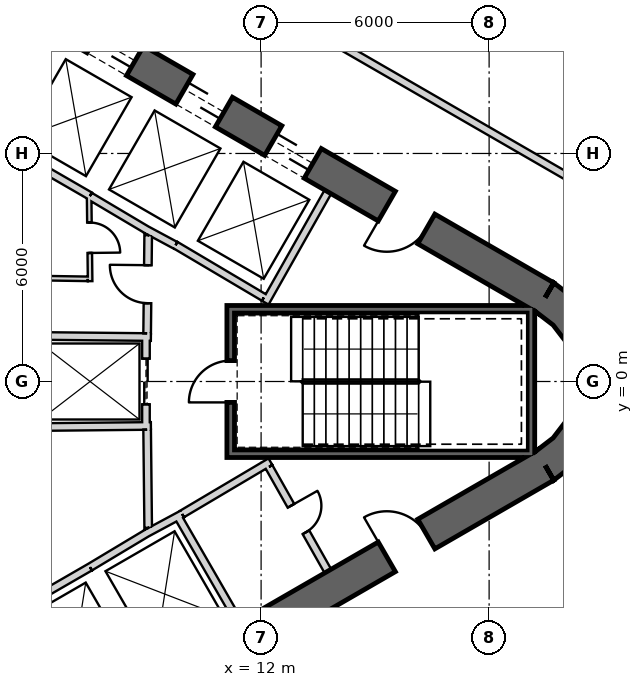
"""IFC4 building model, lengths in metres.
Left out: names, types, materials, properties, quantities, classifications, styles, units other than length and angle.
Written with IfcOpenShell. Run it as: python <this file> out.ifc"""

import sys

from ifc_helpers import new_model, si_unit, direction, frame, frame_2d, origin, place, context, subcontext, project, spatial, polyline, rectangle, outline, extrude, element, fill, save


model = new_model("IFC4")
c1 = context("Model", 3, precision=1e-05, world=origin(), true_north=direction((0.0, 1.0)))
c2 = subcontext(c1, "Body", "Model", "MODEL_VIEW")
j1 = project(units=[si_unit("LENGTHUNIT", "METRE"), si_unit("PLANEANGLEUNIT", "RADIAN")], contexts=[c1])
p1 = place(None, origin())
s1 = spatial("IfcSite", under=j1, at=p1, CompositionType="ELEMENT")
p2 = place(p1, origin())
s2 = spatial("IfcBuilding", under=s1, at=p2, CompositionType="ELEMENT")
p3 = place(p2, frame((0.0, 0.0, 57.8)))
s3 = spatial("IfcBuildingStorey", under=s2, at=p3, CompositionType="ELEMENT", Elevation=57.8)
p4 = place(p3, frame((19.475, 2.208, 0.0), z_axis=(0.0, 0.0, 1.0), x_axis=(-0.866028369851, 0.499994862586, 0.0)))
e1 = element("IfcWall", 1, at=p4, inside=s3, PredefinedType="SHEAR", context=c2, shape_type="SweptSolid", body=[
    extrude(rectangle(XDim=31.523, YDim=0.9, at=frame_2d((15.762, 0.0))), origin(), (0.0, 0.0, 1.0), 4.1),
])
p5 = place(p4, frame((7.062, 0.0, 0.0)))
e2 = element("IfcOpeningElement", 2, at=p5, cuts=e1, PredefinedType="OPENING", context=c2, shape_type="SweptSolid", body=[
    extrude(rectangle(XDim=1.2, YDim=2.4, at=frame_2d((0.6, 1.2))), frame((0.0, 0.46, 0.0), z_axis=(0.0, -1.0, 0.0), x_axis=(1.0, 0.0, 0.0)), (0.0, 0.0, 1.0), 0.92),
])
p6 = place(p4, frame((9.762, 0.0, 0.0)))
e3 = element("IfcOpeningElement", 3, at=p6, cuts=e1, PredefinedType="OPENING", context=c2, shape_type="SweptSolid", body=[
    extrude(rectangle(XDim=1.2, YDim=2.4, at=frame_2d((0.6, 1.2))), frame((0.0, 0.46, 0.0), z_axis=(0.0, -1.0, 0.0), x_axis=(1.0, 0.0, 0.0)), (0.0, 0.0, 1.0), 0.92),
])
p7 = place(p4, frame((12.462, 0.0, 0.0)))
e4 = element("IfcOpeningElement", 4, at=p7, cuts=e1, PredefinedType="OPENING", context=c2, shape_type="SweptSolid", body=[
    extrude(rectangle(XDim=1.2, YDim=2.4, at=frame_2d((0.6, 1.2))), frame((0.0, 0.46, 0.0), z_axis=(0.0, -1.0, 0.0), x_axis=(1.0, 0.0, 0.0)), (0.0, 0.0, 1.0), 0.92),
])
p8 = place(p4, frame((15.162, 0.0, 0.0)))
e5 = element("IfcOpeningElement", 5, at=p8, cuts=e1, PredefinedType="OPENING", context=c2, shape_type="SweptSolid", body=[
    extrude(rectangle(XDim=1.2, YDim=2.4, at=frame_2d((0.6, 1.2))), frame((0.0, 0.46, 0.0), z_axis=(0.0, -1.0, 0.0), x_axis=(1.0, 0.0, 0.0)), (0.0, 0.0, 1.0), 0.92),
])
p9 = place(p4, frame((17.862, 0.0, 0.0)))
e6 = element("IfcOpeningElement", 6, at=p9, cuts=e1, PredefinedType="OPENING", context=c2, shape_type="SweptSolid", body=[
    extrude(rectangle(XDim=1.2, YDim=2.4, at=frame_2d((0.6, 1.2))), frame((0.0, 0.46, 0.0), z_axis=(0.0, -1.0, 0.0), x_axis=(1.0, 0.0, 0.0)), (0.0, 0.0, 1.0), 0.92),
])
p10 = place(p4, frame((20.562, 0.0, 0.0)))
e7 = element("IfcOpeningElement", 7, at=p10, cuts=e1, PredefinedType="OPENING", context=c2, shape_type="SweptSolid", body=[
    extrude(rectangle(XDim=1.2, YDim=2.4, at=frame_2d((0.6, 1.2))), frame((0.0, 0.46, 0.0), z_axis=(0.0, -1.0, 0.0), x_axis=(1.0, 0.0, 0.0)), (0.0, 0.0, 1.0), 0.92),
])
p11 = place(p4, frame((23.262, 0.0, 0.0)))
e8 = element("IfcOpeningElement", 8, at=p11, cuts=e1, PredefinedType="OPENING", context=c2, shape_type="SweptSolid", body=[
    extrude(rectangle(XDim=1.2, YDim=2.4, at=frame_2d((0.6, 1.2))), frame((0.0, 0.46, 0.0), z_axis=(0.0, -1.0, 0.0), x_axis=(1.0, 0.0, 0.0)), (0.0, 0.0, 1.0), 0.92),
])
p12 = place(p4, frame((3.612, 0.0, 0.0)))
e9 = element("IfcOpeningElement", 9, at=p12, cuts=e1, PredefinedType="OPENING", context=c2, shape_type="SweptSolid", body=[
    extrude(rectangle(XDim=1.2, YDim=2.4, at=frame_2d((0.6, 1.2))), frame((0.0, 0.46, 0.0), z_axis=(0.0, -1.0, 0.0), x_axis=(1.0, 0.0, 0.0)), (0.0, 0.0, 1.0), 0.92),
])
p13 = place(p4, frame((26.712, 0.0, 0.0)))
e10 = element("IfcOpeningElement", 10, at=p13, cuts=e1, PredefinedType="OPENING", context=c2, shape_type="SweptSolid", body=[
    extrude(rectangle(XDim=1.2, YDim=2.4, at=frame_2d((0.6, 1.2))), frame((0.0, 0.46, 0.0), z_axis=(0.0, -1.0, 0.0), x_axis=(1.0, 0.0, 0.0)), (0.0, 0.0, 1.0), 0.92),
])
p14 = place(p3, frame((-7.825, -17.97, 0.0), z_axis=(0.0, 0.0, 1.0), x_axis=(0.866028369851, 0.499994862586, 0.0)))
e11 = element("IfcWall", 11, at=p14, inside=s3, PredefinedType="SHEAR", context=c2, shape_type="SweptSolid", body=[
    extrude(rectangle(XDim=31.523, YDim=0.9, at=frame_2d((15.762, 0.0))), origin(), (0.0, 0.0, 1.0), 4.1),
])
p15 = place(p14, frame((7.062, 0.0, 0.0)))
e12 = element("IfcOpeningElement", 12, at=p15, cuts=e11, PredefinedType="OPENING", context=c2, shape_type="SweptSolid", body=[
    extrude(rectangle(XDim=1.2, YDim=2.4, at=frame_2d((0.6, 1.2))), frame((0.0, 0.46, 0.0), z_axis=(0.0, -1.0, 0.0), x_axis=(1.0, 0.0, 0.0)), (0.0, 0.0, 1.0), 0.92),
])
p16 = place(p14, frame((9.762, 0.0, 0.0)))
e13 = element("IfcOpeningElement", 13, at=p16, cuts=e11, PredefinedType="OPENING", context=c2, shape_type="SweptSolid", body=[
    extrude(rectangle(XDim=1.2, YDim=2.4, at=frame_2d((0.6, 1.2))), frame((0.0, 0.46, 0.0), z_axis=(0.0, -1.0, 0.0), x_axis=(1.0, 0.0, 0.0)), (0.0, 0.0, 1.0), 0.92),
])
p17 = place(p14, frame((12.462, 0.0, 0.0)))
e14 = element("IfcOpeningElement", 14, at=p17, cuts=e11, PredefinedType="OPENING", context=c2, shape_type="SweptSolid", body=[
    extrude(rectangle(XDim=1.2, YDim=2.4, at=frame_2d((0.6, 1.2))), frame((0.0, 0.46, 0.0), z_axis=(0.0, -1.0, 0.0), x_axis=(1.0, 0.0, 0.0)), (0.0, 0.0, 1.0), 0.92),
])
p18 = place(p14, frame((15.162, 0.0, 0.0)))
e15 = element("IfcOpeningElement", 15, at=p18, cuts=e11, PredefinedType="OPENING", context=c2, shape_type="SweptSolid", body=[
    extrude(rectangle(XDim=1.2, YDim=2.4, at=frame_2d((0.6, 1.2))), frame((0.0, 0.46, 0.0), z_axis=(0.0, -1.0, 0.0), x_axis=(1.0, 0.0, 0.0)), (0.0, 0.0, 1.0), 0.92),
])
p19 = place(p14, frame((17.862, 0.0, 0.0)))
e16 = element("IfcOpeningElement", 16, at=p19, cuts=e11, PredefinedType="OPENING", context=c2, shape_type="SweptSolid", body=[
    extrude(rectangle(XDim=1.2, YDim=2.4, at=frame_2d((0.6, 1.2))), frame((0.0, 0.46, 0.0), z_axis=(0.0, -1.0, 0.0), x_axis=(1.0, 0.0, 0.0)), (0.0, 0.0, 1.0), 0.92),
])
p20 = place(p14, frame((20.562, 0.0, 0.0)))
e17 = element("IfcOpeningElement", 17, at=p20, cuts=e11, PredefinedType="OPENING", context=c2, shape_type="SweptSolid", body=[
    extrude(rectangle(XDim=1.2, YDim=2.4, at=frame_2d((0.6, 1.2))), frame((0.0, 0.46, 0.0), z_axis=(0.0, -1.0, 0.0), x_axis=(1.0, 0.0, 0.0)), (0.0, 0.0, 1.0), 0.92),
])
p21 = place(p14, frame((26.712, 0.0, 0.0)))
e18 = element("IfcOpeningElement", 18, at=p21, cuts=e11, PredefinedType="OPENING", context=c2, shape_type="SweptSolid", body=[
    extrude(rectangle(XDim=1.2, YDim=2.4, at=frame_2d((0.6, 1.2))), frame((0.0, 0.46, 0.0), z_axis=(0.0, -1.0, 0.0), x_axis=(1.0, 0.0, 0.0)), (0.0, 0.0, 1.0), 0.92),
])
p22 = place(p14, frame((3.612, 0.0, 0.0)))
e19 = element("IfcOpeningElement", 19, at=p22, cuts=e11, PredefinedType="OPENING", context=c2, shape_type="SweptSolid", body=[
    extrude(rectangle(XDim=1.2, YDim=2.4, at=frame_2d((0.6, 1.2))), frame((0.0, 0.46, 0.0), z_axis=(0.0, -1.0, 0.0), x_axis=(1.0, 0.0, 0.0)), (0.0, 0.0, 1.0), 0.92),
])
p23 = place(p3, origin())
e20 = element("IfcWall", 20, at=p23, inside=s3, PredefinedType="SHEAR", context=c2, shape_type="SweptSolid", body=[
    extrude(outline(polyline([(19.7, -2.598), (20.321, -2.121), (20.798, -1.5), (21.098, -0.777), (21.2, 0.0), (21.098, 0.777), (20.798, 1.5), (20.321, 2.121), (19.7, 2.598), (19.25, 1.819), (19.685, 1.485), (20.019, 1.05), (20.229, 0.543), (20.3, 0.0), (20.229, -0.543), (20.019, -1.05), (19.685, -1.485), (19.25, -1.819), (19.7, -2.598)])), origin(), (0.0, 0.0, 1.0), 4.1),
])
p24 = place(p3, frame((7.497, 4.886, 0.0), z_axis=(0.0, 0.0, 1.0), x_axis=(-0.866030989016, 0.499990325971, 0.0)))
e21 = element("IfcWall", 21, at=p24, inside=s3, PredefinedType="PLUMBINGWALL", context=c2, shape_type="SweptSolid", body=[
    extrude(rectangle(XDim=8.1, YDim=0.2, at=frame_2d((4.05, 0.0))), origin(), (0.0, 0.0, 1.0), 3.8),
])
p25 = place(p3, frame((12.11, 2.073, 0.0), z_axis=(0.0, 0.0, 1.0), x_axis=(0.49196600604, 0.870614408852, 0.0)))
e22 = element("IfcWall", 22, at=p25, inside=s3, PredefinedType="PLUMBINGWALL", context=c2, shape_type="SweptSolid", body=[
    extrude(rectangle(XDim=3.35, YDim=0.2, at=frame_2d((1.675, 0.0))), origin(), (0.0, 0.0, 1.0), 3.8),
])
p26 = place(p3, frame((12.073, 2.211, 0.0), z_axis=(0.0, 0.0, 1.0), x_axis=(-0.860438357912, 0.509554542943, 0.0)))
e23 = element("IfcWall", 23, at=p26, inside=s3, PredefinedType="PLUMBINGWALL", context=c2, shape_type="SweptSolid", body=[
    extrude(rectangle(XDim=2.7, YDim=0.2, at=frame_2d((1.35, 0.0))), origin(), (0.0, 0.0, 1.0), 3.8),
])
p27 = place(p3, frame((9.748, 3.583, 0.0), z_axis=(0.0, 0.0, 1.0), x_axis=(-0.880917147855, 0.473270513147, 0.0)))
e24 = element("IfcWall", 24, at=p27, inside=s3, PredefinedType="PLUMBINGWALL", context=c2, shape_type="SweptSolid", body=[
    extrude(rectangle(XDim=0.878, YDim=0.2, at=frame_2d((0.439, 0.0))), origin(), (0.0, 0.0, 1.0), 3.8),
])
p28 = place(p3, frame((9.08, 3.937, 0.0), z_axis=(0.0, 0.0, 1.0), x_axis=(-0.859981807212, 0.510324691999, 0.0)))
e25 = element("IfcWall", 25, at=p28, inside=s3, PredefinedType="PLUMBINGWALL", context=c2, shape_type="SweptSolid", body=[
    extrude(rectangle(XDim=1.845, YDim=0.2, at=frame_2d((0.922, 0.0))), origin(), (0.0, 0.0, 1.0), 3.8),
])
p29 = place(p3, frame((0.483, -8.936, 0.0), z_axis=(0.0, 0.0, 1.0), x_axis=(0.866030989016, 0.499990325971, 0.0)))
e26 = element("IfcWall", 26, at=p29, inside=s3, PredefinedType="PLUMBINGWALL", context=c2, shape_type="SweptSolid", body=[
    extrude(rectangle(XDim=8.1, YDim=0.2, at=frame_2d((4.05, 0.0))), origin(), (0.0, 0.0, 1.0), 3.8),
])
p30 = place(p3, frame((9.795, -3.525, 0.0), z_axis=(0.0, 0.0, 1.0), x_axis=(0.499984717929, -0.866034226713, 0.0)))
e27 = element("IfcWall", 27, at=p30, inside=s3, PredefinedType="PLUMBINGWALL", context=c2, shape_type="SweptSolid", body=[
    extrude(rectangle(XDim=3.25, YDim=0.2, at=frame_2d((1.625, 0.0))), origin(), (0.0, 0.0, 1.0), 3.8),
])
p31 = place(p3, frame((8.974, -3.999, 0.0), z_axis=(0.0, 0.0, 1.0), x_axis=(0.880907015104, 0.473289373154, 0.0)))
e28 = element("IfcWall", 28, at=p31, inside=s3, PredefinedType="PLUMBINGWALL", context=c2, shape_type="SweptSolid", body=[
    extrude(rectangle(XDim=1.078, YDim=0.2, at=frame_2d((0.539, 0.0))), origin(), (0.0, 0.0, 1.0), 3.8),
])
p32 = place(p3, frame((7.497, -4.886, 0.0), z_axis=(0.0, 0.0, 1.0), x_axis=(0.857516281273, 0.51445682749, 0.0)))
e29 = element("IfcWall", 29, at=p32, inside=s3, PredefinedType="PLUMBINGWALL", context=c2, shape_type="SweptSolid", body=[
    extrude(rectangle(XDim=1.845, YDim=0.2, at=frame_2d((0.922, 0.0))), origin(), (0.0, 0.0, 1.0), 3.8),
])
p33 = place(p3, frame((19.2, 1.9, -0.3), z_axis=(0.0, 0.0, 1.0), x_axis=(-1.0, 0.0, 0.0)))
e30 = element("IfcWall", 30, at=p33, inside=s3, PredefinedType="SHEAR", context=c2, shape_type="SweptSolid", body=[
    extrude(rectangle(XDim=8.1, YDim=0.2, at=frame_2d((4.05, 0.0))), origin(), (0.0, 0.0, 1.0), 4.1),
])
p34 = place(p3, frame((19.1, -2.0, -0.3), z_axis=(0.0, 0.0, 1.0), x_axis=(0.0, 1.0, 0.0)))
e31 = element("IfcWall", 31, at=p34, inside=s3, PredefinedType="SHEAR", context=c2, shape_type="SweptSolid", body=[
    extrude(rectangle(XDim=3.8, YDim=0.2, at=frame_2d((1.9, 0.0))), origin(), (0.0, 0.0, 1.0), 4.1),
])
p35 = place(p3, frame((11.1, -1.9, -0.3), z_axis=(0.0, 0.0, 1.0), x_axis=(1.0, 0.0, 0.0)))
e32 = element("IfcWall", 32, at=p35, inside=s3, PredefinedType="SHEAR", context=c2, shape_type="SweptSolid", body=[
    extrude(rectangle(XDim=7.9, YDim=0.2, at=frame_2d((3.95, 0.0))), origin(), (0.0, 0.0, 1.0), 4.1),
])
p36 = place(p3, frame((11.2, -1.8, -0.3), z_axis=(0.0, 0.0, 1.0), x_axis=(0.0, 1.0, 0.0)))
e33 = element("IfcWall", 33, at=p36, inside=s3, PredefinedType="SHEAR", context=c2, shape_type="SweptSolid", body=[
    extrude(rectangle(XDim=3.6, YDim=0.2, at=frame_2d((1.8, 0.0))), origin(), (0.0, 0.0, 1.0), 4.1),
])
p37 = place(p36, frame((1.25, 0.0, 0.3)))
e34 = element("IfcOpeningElement", 34, at=p37, cuts=e33, PredefinedType="OPENING", context=c2, shape_type="SweptSolid", body=[
    extrude(rectangle(XDim=1.1, YDim=2.1, at=frame_2d((0.55, 1.05))), frame((0.0, 0.11, 0.0), z_axis=(0.0, -1.0, 0.0), x_axis=(1.0, 0.0, 0.0)), (0.0, 0.0, 1.0), 0.22),
])
p38 = place(p3, frame((8.97, 1.2, 0.0), z_axis=(0.0, 0.0, 1.0), x_axis=(0.0, -1.0, 0.0)))
e35 = element("IfcWall", 35, at=p38, inside=s3, PredefinedType="PLUMBINGWALL", context=c2, shape_type="SweptSolid", body=[
    extrude(rectangle(XDim=2.4, YDim=0.2, at=frame_2d((1.2, 0.0))), origin(), (0.0, 0.0, 1.0), 3.8),
])
p39 = place(p38, frame((0.6, 0.0, 0.0)))
e36 = element("IfcOpeningElement", 36, at=p39, cuts=e35, PredefinedType="OPENING", context=c2, shape_type="SweptSolid", body=[
    extrude(rectangle(XDim=1.2, YDim=2.4, at=frame_2d((0.6, 1.2))), frame((0.0, 0.11, 0.0), z_axis=(0.0, -1.0, 0.0), x_axis=(1.0, 0.0, 0.0)), (0.0, 0.0, 1.0), 0.22),
])
p40 = place(p3, frame((9.1, -1.169, 0.0), z_axis=(0.0, 0.0, 1.0), x_axis=(-0.999949988, -0.010001074852, 0.0)))
e37 = element("IfcWall", 37, at=p40, inside=s3, PredefinedType="PLUMBINGWALL", context=c2, shape_type="SweptSolid", body=[
    extrude(rectangle(XDim=3.1, YDim=0.2, at=frame_2d((1.55, 0.0))), origin(), (0.0, 0.0, 1.0), 3.8),
])
p41 = place(p3, frame((9.1, 1.169, 0.0), z_axis=(0.0, 0.0, 1.0), x_axis=(-0.99994990606, 0.010009264196, 0.0)))
e38 = element("IfcWall", 38, at=p41, inside=s3, PredefinedType="PLUMBINGWALL", context=c2, shape_type="SweptSolid", body=[
    extrude(rectangle(XDim=3.0, YDim=0.2, at=frame_2d((1.5, 0.0))), origin(), (0.0, 0.0, 1.0), 3.8),
])
p42 = place(p3, frame((12.245, -2.109, 0.0), z_axis=(0.0, 0.0, 1.0), x_axis=(-0.860414880418, -0.509594185166, 0.0)))
e39 = element("IfcWall", 39, at=p42, inside=s3, PredefinedType="PARTITIONING", context=c2, shape_type="SweptSolid", body=[
    extrude(rectangle(XDim=2.7, YDim=0.2, at=frame_2d((1.35, 0.0))), origin(), (0.0, 0.0, 1.0), 3.8),
])
p43 = place(p3, frame((13.758, -4.99, 0.0), z_axis=(0.0, 0.0, 1.0), x_axis=(-0.491993409184, 0.87059892334, 0.0)))
e40 = element("IfcWall", 40, at=p43, inside=s3, PredefinedType="PARTITIONING", context=c2, shape_type="SweptSolid", body=[
    extrude(rectangle(XDim=3.15, YDim=0.2, at=frame_2d((1.575, 0.0))), origin(), (0.0, 0.0, 1.0), 3.8),
])
p44 = place(p43, frame((1.175, 0.0, 0.0)))
e41 = element("IfcOpeningElement", 41, at=p44, cuts=e40, PredefinedType="OPENING", context=c2, shape_type="SweptSolid", body=[
    extrude(rectangle(XDim=0.8, YDim=2.1, at=frame_2d((0.4, 1.05))), frame((0.0, 0.11, 0.0), z_axis=(0.0, -1.0, 0.0), x_axis=(1.0, 0.0, 0.0)), (0.0, 0.0, 1.0), 0.22),
])
p45 = place(p3, frame((9.029, -3.851, 0.0), z_axis=(0.0, 0.0, 1.0), x_axis=(-0.010784614026, 0.999941844359, 0.0)))
e42 = element("IfcWall", 42, at=p45, inside=s3, PredefinedType="PARTITIONING", context=c2, shape_type="SweptSolid", body=[
    extrude(rectangle(XDim=2.581, YDim=0.2, at=frame_2d((1.291, 0.0))), origin(), (0.0, 0.0, 1.0), 3.8),
])
p46 = place(p3, frame((9.001, 1.27, 0.0), z_axis=(0.0, 0.0, 1.0), x_axis=(0.010783593937, 0.99994185536, 0.0)))
e43 = element("IfcWall", 43, at=p46, inside=s3, PredefinedType="PARTITIONING", context=c2, shape_type="SweptSolid", body=[
    extrude(rectangle(XDim=2.581, YDim=0.2, at=frame_2d((1.291, 0.0))), origin(), (0.0, 0.0, 1.0), 3.8),
])
p47 = place(p46, frame((0.791, 0.0, 0.0)))
e44 = element("IfcOpeningElement", 44, at=p47, cuts=e43, PredefinedType="OPENING", context=c2, shape_type="SweptSolid", body=[
    extrude(rectangle(XDim=1.0, YDim=2.1, at=frame_2d((0.5, 1.05))), frame((0.0, 0.11, 0.0), z_axis=(0.0, -1.0, 0.0), x_axis=(1.0, 0.0, 0.0)), (0.0, 0.0, 1.0), 0.22),
])
p48 = place(p3, frame((7.501, 2.64, 0.0), z_axis=(0.0, 0.0, 1.0), x_axis=(-0.01174194727, 0.999931060961, 0.0)))
e45 = element("IfcWall", 45, at=p48, inside=s3, PredefinedType="PARTITIONING", context=c2, shape_type="SweptSolid", body=[
    extrude(rectangle(XDim=2.225, YDim=0.12, at=frame_2d((1.112, 0.0))), origin(), (0.0, 0.0, 1.0), 3.8),
])
p49 = place(p48, frame((0.742, 0.0, 0.0)))
e46 = element("IfcOpeningElement", 46, at=p49, cuts=e45, PredefinedType="OPENING", context=c2, shape_type="SweptSolid", body=[
    extrude(rectangle(XDim=0.8, YDim=2.1, at=frame_2d((0.4, 1.05))), frame((0.0, 0.07, 0.0), z_axis=(0.0, -1.0, 0.0), x_axis=(1.0, 0.0, 0.0)), (0.0, 0.0, 1.0), 0.14),
])
p50 = place(p3, frame((5.617, 2.729, 0.0), z_axis=(0.0, 0.0, 1.0), x_axis=(0.999881424181, -0.015399271967, 0.0)))
e47 = element("IfcWall", 47, at=p50, inside=s3, PredefinedType="PARTITIONING", context=c2, shape_type="SweptSolid", body=[
    extrude(rectangle(XDim=1.823, YDim=0.12, at=frame_2d((0.912, 0.0))), origin(), (0.0, 0.0, 1.0), 3.8),
])
p51 = place(p3, frame((21.552, 4.531, 0.0), z_axis=(0.0, 0.0, 1.0), x_axis=(-0.866023703603, 0.500002944789, 0.0)))
e48 = element("IfcWall", 48, at=p51, inside=s3, PredefinedType="PARTITIONING", context=c2, shape_type="SweptSolid", body=[
    extrude(rectangle(XDim=32.599, YDim=0.2, at=frame_2d((16.299, 0.0))), origin(), (0.0, 0.0, 1.0), 2.98),
])
p52 = place(p51, frame((27.579, 0.0, 0.0)))
e49 = element("IfcOpeningElement", 49, at=p52, cuts=e48, PredefinedType="OPENING", context=c2, shape_type="SweptSolid", body=[
    extrude(rectangle(XDim=1.0, YDim=2.1, at=frame_2d((0.5, 1.05))), frame((0.0, 0.11, 0.0), z_axis=(0.0, -1.0, 0.0), x_axis=(1.0, 0.0, 0.0)), (0.0, 0.0, 1.0), 0.22),
])
p53 = place(p51, frame((11.33, 0.0, 0.0)))
e50 = element("IfcOpeningElement", 50, at=p53, cuts=e48, PredefinedType="OPENING", context=c2, shape_type="SweptSolid", body=[
    extrude(rectangle(XDim=1.0, YDim=2.1, at=frame_2d((0.5, 1.05))), frame((0.0, 0.11, 0.0), z_axis=(0.0, -1.0, 0.0), x_axis=(1.0, 0.0, 0.0)), (0.0, 0.0, 1.0), 0.22),
])
p54 = place(p3, frame((-6.644, -21.503, 0.0), z_axis=(0.0, 0.0, 1.0), x_axis=(0.866025615729, 0.499999632902, 0.0)))
e51 = element("IfcWall", 51, at=p54, inside=s3, PredefinedType="PARTITIONING", context=c2, shape_type="SweptSolid", body=[
    extrude(rectangle(XDim=32.811, YDim=0.2, at=frame_2d((16.405, 0.0))), origin(), (0.0, 0.0, 1.0), 2.98),
])
p55 = place(p54, frame((24.32, 0.0, 0.0)))
e52 = element("IfcOpeningElement", 52, at=p55, cuts=e51, PredefinedType="OPENING", context=c2, shape_type="SweptSolid", body=[
    extrude(rectangle(XDim=1.0, YDim=2.1, at=frame_2d((0.5, 1.05))), frame((0.0, 0.11, 0.0), z_axis=(0.0, -1.0, 0.0), x_axis=(1.0, 0.0, 0.0)), (0.0, 0.0, 1.0), 0.22),
])
p56 = place(p54, frame((7.965, 0.0, 0.0)))
e53 = element("IfcOpeningElement", 53, at=p56, cuts=e51, PredefinedType="OPENING", context=c2, shape_type="SweptSolid", body=[
    extrude(rectangle(XDim=1.0, YDim=2.1, at=frame_2d((0.5, 1.05))), frame((0.0, 0.11, 0.0), z_axis=(0.0, -1.0, 0.0), x_axis=(1.0, 0.0, 0.0)), (0.0, 0.0, 1.0), 0.22),
])
p57 = place(p37, origin())
e54 = element("IfcDoor", 54, at=p57, inside=s3, OperationType="SINGLE_SWING_LEFT", PredefinedType="USERDEFINED", context=c2, shape_type="SweptSolid", body=[
    extrude(rectangle(XDim=1.1, YDim=2.1, at=frame_2d((0.55, 1.05))), frame((0.0, 0.025, 0.0), z_axis=(0.0, -1.0, 0.0), x_axis=(1.0, 0.0, 0.0)), (0.0, 0.0, 1.0), 0.05),
])
fill(e34, e54)
p58 = place(p47, origin())
e55 = element("IfcDoor", 55, at=p58, inside=s3, OperationType="SINGLE_SWING_RIGHT", PredefinedType="USERDEFINED", context=c2, shape_type="SweptSolid", body=[
    extrude(rectangle(XDim=1.0, YDim=2.1, at=frame_2d((0.5, 1.05))), frame((0.0, 0.025, 0.0), z_axis=(0.0, -1.0, 0.0), x_axis=(1.0, 0.0, 0.0)), (0.0, 0.0, 1.0), 0.05),
])
fill(e44, e55)
p59 = place(p39, origin())
e56 = element("IfcDoor", 56, at=p59, inside=s3, OperationType="SLIDING_TO_LEFT", PredefinedType="USERDEFINED", context=c2, shape_type="SweptSolid", body=[
    extrude(rectangle(XDim=1.2, YDim=2.4, at=frame_2d((0.6, 1.2))), frame((0.0, 0.025, 0.0), z_axis=(0.0, -1.0, 0.0), x_axis=(1.0, 0.0, 0.0)), (0.0, 0.0, 1.0), 0.05),
])
fill(e36, e56)
p60 = place(p49, origin())
e57 = element("IfcDoor", 57, at=p60, inside=s3, OperationType="SINGLE_SWING_LEFT", PredefinedType="USERDEFINED", context=c2, shape_type="SweptSolid", body=[
    extrude(rectangle(XDim=0.8, YDim=2.1, at=frame_2d((0.4, 1.05))), frame((0.0, 0.025, 0.0), z_axis=(0.0, -1.0, 0.0), x_axis=(1.0, 0.0, 0.0)), (0.0, 0.0, 1.0), 0.05),
])
fill(e46, e57)
p61 = place(p44, origin())
e58 = element("IfcDoor", 58, at=p61, inside=s3, OperationType="SINGLE_SWING_LEFT", PredefinedType="USERDEFINED", context=c2, shape_type="SweptSolid", body=[
    extrude(rectangle(XDim=0.8, YDim=2.1, at=frame_2d((0.4, 1.05))), frame((0.0, 0.025, 0.0), z_axis=(0.0, -1.0, 0.0), x_axis=(1.0, 0.0, 0.0)), (0.0, 0.0, 1.0), 0.05),
])
fill(e41, e58)
p62 = place(p5, origin())
e59 = element("IfcDoor", 59, at=p62, inside=s3, OperationType="SLIDING_TO_LEFT", PredefinedType="USERDEFINED", context=c2, shape_type="SweptSolid", body=[
    extrude(rectangle(XDim=1.2, YDim=2.4, at=frame_2d((0.6, 1.2))), frame((0.0, 0.025, 0.0), z_axis=(0.0, -1.0, 0.0), x_axis=(1.0, 0.0, 0.0)), (0.0, 0.0, 1.0), 0.05),
])
fill(e2, e59)
p63 = place(p6, origin())
e60 = element("IfcDoor", 60, at=p63, inside=s3, OperationType="SLIDING_TO_LEFT", PredefinedType="USERDEFINED", context=c2, shape_type="SweptSolid", body=[
    extrude(rectangle(XDim=1.2, YDim=2.4, at=frame_2d((0.6, 1.2))), frame((0.0, 0.025, 0.0), z_axis=(0.0, -1.0, 0.0), x_axis=(1.0, 0.0, 0.0)), (0.0, 0.0, 1.0), 0.05),
])
fill(e3, e60)
p64 = place(p7, origin())
e61 = element("IfcDoor", 61, at=p64, inside=s3, OperationType="SLIDING_TO_LEFT", PredefinedType="USERDEFINED", context=c2, shape_type="SweptSolid", body=[
    extrude(rectangle(XDim=1.2, YDim=2.4, at=frame_2d((0.6, 1.2))), frame((0.0, 0.025, 0.0), z_axis=(0.0, -1.0, 0.0), x_axis=(1.0, 0.0, 0.0)), (0.0, 0.0, 1.0), 0.05),
])
fill(e4, e61)
p65 = place(p21, origin())
e62 = element("IfcDoor", 62, at=p65, inside=s3, OperationType="SINGLE_SWING_RIGHT", PredefinedType="USERDEFINED", context=c2, shape_type="SweptSolid", body=[
    extrude(rectangle(XDim=1.2, YDim=2.4, at=frame_2d((0.6, 1.2))), frame((0.0, 0.025, 0.0), z_axis=(0.0, -1.0, 0.0), x_axis=(1.0, 0.0, 0.0)), (0.0, 0.0, 1.0), 0.05),
])
fill(e18, e62)
p66 = place(p12, origin())
e63 = element("IfcDoor", 63, at=p66, inside=s3, OperationType="SINGLE_SWING_LEFT", PredefinedType="USERDEFINED", context=c2, shape_type="SweptSolid", body=[
    extrude(rectangle(XDim=1.2, YDim=2.4, at=frame_2d((0.6, 1.2))), frame((0.0, 0.025, 0.0), z_axis=(0.0, -1.0, 0.0), x_axis=(1.0, 0.0, 0.0)), (0.0, 0.0, 1.0), 0.05),
])
fill(e9, e63)
save(model, sys.argv[1])
